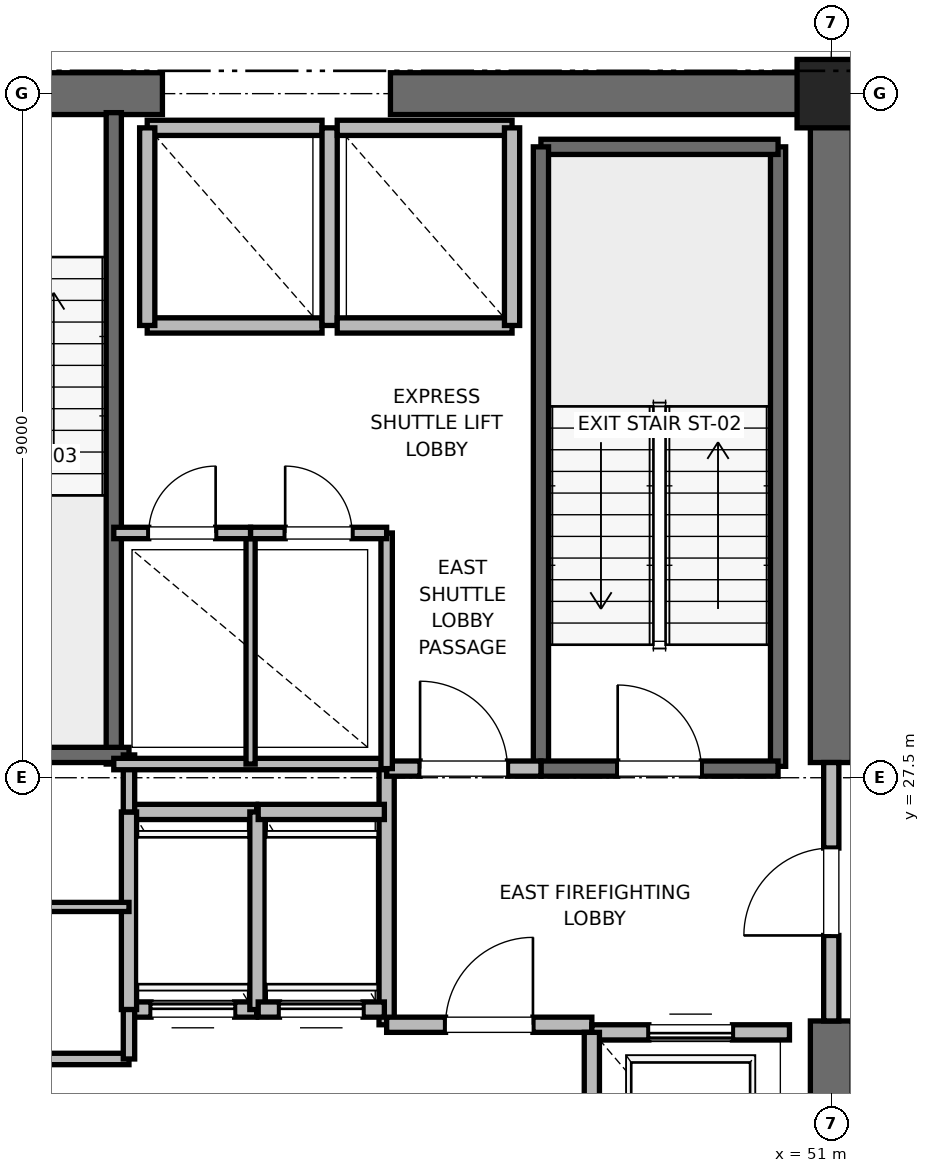
"""IFC4 building model, lengths in metres.
Left out: names, types, materials, properties, quantities, classifications, styles, units other than length and angle.
Written with IfcOpenShell. Run it as: python <this file> out.ifc"""

import sys

from ifc_helpers import new_model, si_unit, direction, frame, frame_2d, origin, origin_2d, place, context, subcontext, project, spatial, rectangle, extrude, element, fill, save


model = new_model("IFC4")
c1 = context("Model", 3, precision=1e-05, world=origin(), true_north=direction((0.0, 1.0)))
c2 = subcontext(c1, "Body", "Model", "MODEL_VIEW")
j1 = project(units=[si_unit("LENGTHUNIT", "METRE"), si_unit("PLANEANGLEUNIT", "RADIAN")], contexts=[c1])
p1 = place(None, origin())
s1 = spatial("IfcSite", under=j1, at=p1, CompositionType="ELEMENT")
p2 = place(p1, origin())
s2 = spatial("IfcBuilding", under=s1, at=p2, CompositionType="ELEMENT")
p3 = place(p2, frame((0.0, 0.0, 205.2)))
s3 = spatial("IfcBuildingStorey", under=s2, at=p3, CompositionType="ELEMENT", Elevation=205.2)
p4 = place(p3, frame((51.0, 36.5, 0.0), z_axis=(0.0, 0.0, 1.0), x_axis=(1.0, 0.0, 0.0)))
e1 = element("IfcColumn", 1, at=p4, inside=s3, PredefinedType="PILASTER", context=c2, shape_type="SweptSolid", body=[
    extrude(rectangle(XDim=0.9, YDim=0.9, at=origin_2d()), origin(), (0.0, 0.0, 1.0), 4.0),
])
p5 = place(p3, frame((37.8, 36.5, 0.0), z_axis=(0.0, 0.0, 1.0), x_axis=(1.0, 0.0, 0.0)))
e2 = element("IfcWall", 2, at=p5, inside=s3, PredefinedType="SHEAR", context=c2, shape_type="SweptSolid", body=[
    extrude(rectangle(XDim=4.4, YDim=0.55, at=frame_2d((2.2, 0.0))), origin(), (0.0, 0.0, 1.0), 3.775),
])
p6 = place(p5, frame((1.65, 0.0, 0.0)))
e3 = element("IfcOpeningElement", 3, at=p6, cuts=e2, PredefinedType="OPENING", context=c2, shape_type="SweptSolid", body=[
    extrude(rectangle(XDim=1.1, YDim=2.15, at=frame_2d((0.55, 1.075))), frame((0.0, 0.275, 0.0), z_axis=(0.0, -1.0, 0.0), x_axis=(1.0, 0.0, 0.0)), (0.0, 0.0, 1.0), 0.55),
])
for number, where, z_axis, x_axis in (
    (4, (45.2, 36.5, 0.0), (0.0, 0.0, 1.0), (1.0, 0.0, 0.0)),
    (5, (51.0, 18.5, 0.0), (0.0, 0.0, 1.0), (0.0, 1.0, 0.0)),
):
    element("IfcWall", number, at=place(p3, frame(where, z_axis=z_axis, x_axis=x_axis)), inside=s3, PredefinedType="SHEAR", context=c2, shape_type="SweptSolid", body=[
        extrude(rectangle(XDim=5.8, YDim=0.55, at=frame_2d((2.9, 0.0))), origin(), (0.0, 0.0, 1.0), 3.775),
    ])
p7 = place(p3, frame((51.0, 27.7, 0.0), z_axis=(0.0, 0.0, 1.0), x_axis=(0.0, 1.0, 0.0)))
e6 = element("IfcWall", 6, at=p7, inside=s3, PredefinedType="SHEAR", context=c2, shape_type="SweptSolid", body=[
    extrude(rectangle(XDim=8.8, YDim=0.55, at=frame_2d((4.4, 0.0))), origin(), (0.0, 0.0, 1.0), 3.775),
])
p8 = place(p3, frame((50.3, 27.65, 0.0), z_axis=(0.0, 0.0, 1.0), x_axis=(0.0, 1.0, 0.0)))
e7 = element("IfcWall", 7, at=p8, inside=s3, PredefinedType="SOLIDWALL", context=c2, shape_type="SweptSolid", body=[
    extrude(rectangle(XDim=8.15, YDim=0.2, at=frame_2d((4.075, 0.0))), origin(), (0.0, 0.0, 1.0), 3.775),
])
p9 = place(p3, frame((47.18, 35.8, 0.0), z_axis=(0.0, 0.0, 1.0), x_axis=(1.0, 0.0, 0.0)))
e8 = element("IfcWall", 8, at=p9, inside=s3, PredefinedType="SOLIDWALL", context=c2, shape_type="SweptSolid", body=[
    extrude(rectangle(XDim=3.12, YDim=0.2, at=frame_2d((1.56, 0.0))), origin(), (0.0, 0.0, 1.0), 3.775),
])
p10 = place(p3, frame((47.18, 27.62, 0.0), z_axis=(0.0, 0.0, 1.0), x_axis=(0.0, 1.0, 0.0)))
e9 = element("IfcWall", 9, at=p10, inside=s3, PredefinedType="SOLIDWALL", context=c2, shape_type="SweptSolid", body=[
    extrude(rectangle(XDim=8.18, YDim=0.2, at=frame_2d((4.09, 0.0))), origin(), (0.0, 0.0, 1.0), 3.775),
])
p11 = place(p3, frame((47.18, 27.62, 0.0), z_axis=(0.0, 0.0, 1.0), x_axis=(1.0, 0.0, 0.0)))
e10 = element("IfcWall", 10, at=p11, inside=s3, PredefinedType="SOLIDWALL", context=c2, shape_type="SweptSolid", body=[
    extrude(rectangle(XDim=3.12, YDim=0.2, at=frame_2d((1.56, 0.0))), origin(), (0.0, 0.0, 1.0), 3.775),
])
p12 = place(p11, frame((1.01, 0.0, 0.0)))
e11 = element("IfcOpeningElement", 11, at=p12, cuts=e10, PredefinedType="OPENING", context=c2, shape_type="SweptSolid", body=[
    extrude(rectangle(XDim=1.1, YDim=2.15, at=frame_2d((0.55, 1.075))), frame((0.0, 0.1, 0.0), z_axis=(0.0, -1.0, 0.0), x_axis=(1.0, 0.0, 0.0)), (0.0, 0.0, 1.0), 0.2),
])
p13 = place(p3, frame((41.56, 27.68, 0.0), z_axis=(0.0, 0.0, 1.0), x_axis=(0.0, 1.0, 0.0)))
e12 = element("IfcWall", 12, at=p13, inside=s3, PredefinedType="SOLIDWALL", context=c2, shape_type="SweptSolid", body=[
    extrude(rectangle(XDim=8.57, YDim=0.2, at=frame_2d((4.285, 0.0))), origin(), (0.0, 0.0, 1.0), 3.775),
])
p14 = place(p3, frame((38.44, 27.8, 0.0), z_axis=(0.0, 0.0, 1.0), x_axis=(1.0, 0.0, 0.0)))
e13 = element("IfcWall", 13, at=p14, inside=s3, PredefinedType="SOLIDWALL", context=c2, shape_type="SweptSolid", body=[
    extrude(rectangle(XDim=3.32, YDim=0.2, at=frame_2d((1.66, 0.0))), origin(), (0.0, 0.0, 1.0), 3.775),
])
p15 = place(p3, frame((45.15, 24.25, 0.0), z_axis=(0.0, 0.0, 1.0), x_axis=(0.0, 1.0, 0.0)))
e14 = element("IfcWall", 14, at=p15, inside=s3, PredefinedType="PARTITIONING", context=c2, shape_type="SweptSolid", body=[
    extrude(rectangle(XDim=3.37, YDim=0.2, at=frame_2d((1.685, 0.0))), origin(), (0.0, 0.0, 1.0), 3.775),
])
p16 = place(p3, frame((45.15, 24.25, 0.0), z_axis=(0.0, 0.0, 1.0), x_axis=(1.0, 0.0, 0.0)))
e15 = element("IfcWall", 15, at=p16, inside=s3, PredefinedType="PARTITIONING", context=c2, shape_type="SweptSolid", body=[
    extrude(rectangle(XDim=2.7, YDim=0.2, at=frame_2d((1.35, 0.0))), origin(), (0.0, 0.0, 1.0), 3.775),
])
p17 = place(p16, frame((0.775, 0.0, 0.0)))
e16 = element("IfcOpeningElement", 16, at=p17, cuts=e15, PredefinedType="OPENING", context=c2, shape_type="SweptSolid", body=[
    extrude(rectangle(XDim=1.15, YDim=2.2, at=frame_2d((0.575, 1.1))), frame((0.0, 0.1, 0.0), z_axis=(0.0, -1.0, 0.0), x_axis=(1.0, 0.0, 0.0)), (0.0, 0.0, 1.0), 0.2),
])
p18 = place(p3, frame((45.15, 27.62, 0.0), z_axis=(0.0, 0.0, 1.0), x_axis=(1.0, 0.0, 0.0)))
e17 = element("IfcWall", 17, at=p18, inside=s3, PredefinedType="PARTITIONING", context=c2, shape_type="SweptSolid", body=[
    extrude(rectangle(XDim=2.03, YDim=0.2, at=frame_2d((1.015, 0.0))), origin(), (0.0, 0.0, 1.0), 3.775),
])
p19 = place(p18, frame((0.44, 0.0, 0.0)))
e18 = element("IfcOpeningElement", 18, at=p19, cuts=e17, PredefinedType="OPENING", context=c2, shape_type="SweptSolid", body=[
    extrude(rectangle(XDim=1.15, YDim=2.2, at=frame_2d((0.575, 1.1))), frame((0.0, 0.1, 0.0), z_axis=(0.0, -1.0, 0.0), x_axis=(1.0, 0.0, 0.0)), (0.0, 0.0, 1.0), 0.2),
])
p20 = place(p3, frame((51.0, 24.3, 0.0), z_axis=(0.0, 0.0, 1.0), x_axis=(0.0, 1.0, 0.0)))
e19 = element("IfcWall", 19, at=p20, inside=s3, PredefinedType="PARTITIONING", context=c2, shape_type="SweptSolid", body=[
    extrude(rectangle(XDim=3.4, YDim=0.2, at=frame_2d((1.7, 0.0))), origin(), (0.0, 0.0, 1.0), 2.755),
])
p21 = place(p20, frame((1.125, 0.0, 0.0)))
e20 = element("IfcOpeningElement", 20, at=p21, cuts=e19, PredefinedType="OPENING", context=c2, shape_type="SweptSolid", body=[
    extrude(rectangle(XDim=1.15, YDim=2.2, at=frame_2d((0.575, 1.1))), frame((0.0, 0.1, 0.0), z_axis=(0.0, -1.0, 0.0), x_axis=(1.0, 0.0, 0.0)), (0.0, 0.0, 1.0), 0.2),
])
p22 = place(p3, frame((50.45, 24.15, 0.0), z_axis=(0.0, 0.0, 1.0), x_axis=(-1.0, 0.0, 0.0)))
e21 = element("IfcWall", 21, at=p22, inside=s3, PredefinedType="SOLIDWALL", context=c2, shape_type="SweptSolid", body=[
    extrude(rectangle(XDim=2.6, YDim=0.2, at=frame_2d((1.3, 0.0))), origin(), (0.0, 0.0, 1.0), 2.755),
])
p23 = place(p22, frame((0.75, 0.0, 0.0)))
e22 = element("IfcOpeningElement", 22, at=p23, cuts=e21, PredefinedType="OPENING", context=c2, shape_type="SweptSolid", body=[
    extrude(rectangle(XDim=1.1, YDim=2.2, at=frame_2d((0.55, 1.1))), frame((0.0, 0.1, 0.0), z_axis=(0.0, -1.0, 0.0), x_axis=(1.0, 0.0, 0.0)), (0.0, 0.0, 1.0), 0.2),
])
p24 = place(p3, frame((47.85, 24.15, 0.0), z_axis=(0.0, 0.0, 1.0), x_axis=(0.0, -1.0, 0.0)))
e23 = element("IfcWall", 23, at=p24, inside=s3, PredefinedType="SOLIDWALL", context=c2, shape_type="SweptSolid", body=[
    extrude(rectangle(XDim=3.0, YDim=0.2, at=frame_2d((1.5, 0.0))), origin(), (0.0, 0.0, 1.0), 3.775),
])
p25 = place(p3, frame((41.76, 24.45, 0.0), z_axis=(0.0, 0.0, 1.0), x_axis=(1.0, 0.0, 0.0)))
e24 = element("IfcWall", 24, at=p25, inside=s3, PredefinedType="SOLIDWALL", context=c2, shape_type="SweptSolid", body=[
    extrude(rectangle(XDim=1.68, YDim=0.2, at=frame_2d((0.84, 0.0))), origin(), (0.0, 0.0, 1.0), 3.775),
])
p26 = place(p25, frame((0.29, 0.0, 0.0)))
e25 = element("IfcOpeningElement", 25, at=p26, cuts=e24, PredefinedType="OPENING", context=c2, shape_type="SweptSolid", body=[
    extrude(rectangle(XDim=1.1, YDim=2.2, at=frame_2d((0.55, 1.1))), frame((0.0, 0.1, 0.0), z_axis=(0.0, -1.0, 0.0), x_axis=(1.0, 0.0, 0.0)), (0.0, 0.0, 1.0), 0.2),
])
p27 = place(p3, frame((43.44, 27.05, 0.0), z_axis=(0.0, 0.0, 1.0), x_axis=(-1.0, 0.0, 0.0)))
e26 = element("IfcWall", 26, at=p27, inside=s3, PredefinedType="SOLIDWALL", context=c2, shape_type="SweptSolid", body=[
    extrude(rectangle(XDim=1.68, YDim=0.2, at=frame_2d((0.84, 0.0))), origin(), (0.0, 0.0, 1.0), 3.775),
])
for number, where, z_axis, x_axis in (
    (27, (41.76, 27.05, 0.0), (0.0, 0.0, 1.0), (0.0, -1.0, 0.0)),
    (28, (43.45, 24.45, 0.0), (0.0, 0.0, 1.0), (0.0, 1.0, 0.0)),
):
    element("IfcWall", number, at=place(p3, frame(where, z_axis=z_axis, x_axis=x_axis)), inside=s3, PredefinedType="SOLIDWALL", context=c2, shape_type="SweptSolid", body=[
        extrude(rectangle(XDim=2.6, YDim=0.2, at=frame_2d((1.3, 0.0))), origin(), (0.0, 0.0, 1.0), 3.775),
    ])
p28 = place(p3, frame((43.46, 24.45, 0.0), z_axis=(0.0, 0.0, 1.0), x_axis=(1.0, 0.0, 0.0)))
e29 = element("IfcWall", 29, at=p28, inside=s3, PredefinedType="SOLIDWALL", context=c2, shape_type="SweptSolid", body=[
    extrude(rectangle(XDim=1.66, YDim=0.2, at=frame_2d((0.83, 0.0))), origin(), (0.0, 0.0, 1.0), 3.775),
])
p29 = place(p28, frame((0.28, 0.0, 0.0)))
e30 = element("IfcOpeningElement", 30, at=p29, cuts=e29, PredefinedType="OPENING", context=c2, shape_type="SweptSolid", body=[
    extrude(rectangle(XDim=1.1, YDim=2.2, at=frame_2d((0.55, 1.1))), frame((0.0, 0.1, 0.0), z_axis=(0.0, -1.0, 0.0), x_axis=(1.0, 0.0, 0.0)), (0.0, 0.0, 1.0), 0.2),
])
p30 = place(p3, frame((45.12, 27.05, 0.0), z_axis=(0.0, 0.0, 1.0), x_axis=(-1.0, 0.0, 0.0)))
e31 = element("IfcWall", 31, at=p30, inside=s3, PredefinedType="SOLIDWALL", context=c2, shape_type="SweptSolid", body=[
    extrude(rectangle(XDim=1.66, YDim=0.2, at=frame_2d((0.83, 0.0))), origin(), (0.0, 0.0, 1.0), 3.775),
])
p31 = place(p3, frame((42.0, 33.45, 0.0), z_axis=(0.0, 0.0, 1.0), x_axis=(1.0, 0.0, 0.0)))
e32 = element("IfcWall", 32, at=p31, inside=s3, PredefinedType="SOLIDWALL", context=c2, shape_type="SweptSolid", body=[
    extrude(rectangle(XDim=2.3, YDim=0.2, at=frame_2d((1.15, 0.0))), origin(), (0.0, 0.0, 1.0), 3.775),
])
p32 = place(p3, frame((44.3, 36.05, 0.0), z_axis=(0.0, 0.0, 1.0), x_axis=(-1.0, 0.0, 0.0)))
e33 = element("IfcWall", 33, at=p32, inside=s3, PredefinedType="SOLIDWALL", context=c2, shape_type="SweptSolid", body=[
    extrude(rectangle(XDim=2.3, YDim=0.2, at=frame_2d((1.15, 0.0))), origin(), (0.0, 0.0, 1.0), 2.755),
])
for number, where, z_axis, x_axis in (
    (34, (42.0, 36.05, 0.0), (0.0, 0.0, 1.0), (0.0, -1.0, 0.0)),
    (35, (44.4, 33.45, 0.0), (0.0, 0.0, 1.0), (0.0, 1.0, 0.0)),
):
    element("IfcWall", number, at=place(p3, frame(where, z_axis=z_axis, x_axis=x_axis)), inside=s3, PredefinedType="SOLIDWALL", context=c2, shape_type="SweptSolid", body=[
        extrude(rectangle(XDim=2.6, YDim=0.2, at=frame_2d((1.3, 0.0))), origin(), (0.0, 0.0, 1.0), 2.755),
    ])
p33 = place(p3, frame((44.5, 33.45, 0.0), z_axis=(0.0, 0.0, 1.0), x_axis=(1.0, 0.0, 0.0)))
e36 = element("IfcWall", 36, at=p33, inside=s3, PredefinedType="SOLIDWALL", context=c2, shape_type="SweptSolid", body=[
    extrude(rectangle(XDim=2.3, YDim=0.2, at=frame_2d((1.15, 0.0))), origin(), (0.0, 0.0, 1.0), 3.775),
])
p34 = place(p3, frame((46.8, 36.05, 0.0), z_axis=(0.0, 0.0, 1.0), x_axis=(-1.0, 0.0, 0.0)))
e37 = element("IfcWall", 37, at=p34, inside=s3, PredefinedType="SOLIDWALL", context=c2, shape_type="SweptSolid", body=[
    extrude(rectangle(XDim=2.3, YDim=0.2, at=frame_2d((1.15, 0.0))), origin(), (0.0, 0.0, 1.0), 2.755),
])
p35 = place(p3, frame((46.8, 33.45, 0.0), z_axis=(0.0, 0.0, 1.0), x_axis=(0.0, 1.0, 0.0)))
e38 = element("IfcWall", 38, at=p35, inside=s3, PredefinedType="SOLIDWALL", context=c2, shape_type="SweptSolid", body=[
    extrude(rectangle(XDim=2.6, YDim=0.2, at=frame_2d((1.3, 0.0))), origin(), (0.0, 0.0, 1.0), 3.775),
])
p36 = place(p3, frame((39.95, 23.8, 0.0), z_axis=(0.0, 0.0, 1.0), x_axis=(1.0, 0.0, 0.0)))
e39 = element("IfcWall", 39, at=p36, inside=s3, PredefinedType="PARTITIONING", context=c2, shape_type="SweptSolid", body=[
    extrude(rectangle(XDim=1.81, YDim=0.15, at=frame_2d((0.905, 0.0))), origin(), (0.0, 0.0, 1.0), 2.85),
])
p37 = place(p3, frame((39.95, 25.8, 0.0), z_axis=(0.0, 0.0, 1.0), x_axis=(1.0, 0.0, 0.0)))
e40 = element("IfcWall", 40, at=p37, inside=s3, PredefinedType="PARTITIONING", context=c2, shape_type="SweptSolid", body=[
    extrude(rectangle(XDim=1.81, YDim=0.12, at=frame_2d((0.905, 0.0))), origin(), (0.0, 0.0, 1.0), 2.85),
])
p38 = place(p3, frame((41.76, 23.8, 0.0), z_axis=(0.0, 0.0, 1.0), x_axis=(0.0, 1.0, 0.0)))
e41 = element("IfcWall", 41, at=p38, inside=s3, PredefinedType="PARTITIONING", context=c2, shape_type="SweptSolid", body=[
    extrude(rectangle(XDim=0.65, YDim=0.15, at=frame_2d((0.325, 0.0))), origin(), (0.0, 0.0, 1.0), 2.85),
])
p39 = place(p3, frame((41.76, 27.05, 0.0), z_axis=(0.0, 0.0, 1.0), x_axis=(0.0, 1.0, 0.0)))
e42 = element("IfcWall", 42, at=p39, inside=s3, PredefinedType="PARTITIONING", context=c2, shape_type="SweptSolid", body=[
    extrude(rectangle(XDim=0.75, YDim=0.15, at=frame_2d((0.375, 0.0))), origin(), (0.0, 0.0, 1.0), 2.85),
])
p40 = place(p3, frame((41.56, 27.68, 0.0), z_axis=(0.0, 0.0, 1.0), x_axis=(1.0, 0.0, 0.0)))
e43 = element("IfcWall", 43, at=p40, inside=s3, PredefinedType="PARTITIONING", context=c2, shape_type="SweptSolid", body=[
    extrude(rectangle(XDim=3.59, YDim=0.15, at=frame_2d((1.795, 0.0))), origin(), (0.0, 0.0, 1.0), 2.85),
])
p41 = place(p3, frame((45.15, 27.62, 0.0), z_axis=(0.0, 0.0, 1.0), x_axis=(0.0, 1.0, 0.0)))
e44 = element("IfcWall", 44, at=p41, inside=s3, PredefinedType="PARTITIONING", context=c2, shape_type="SweptSolid", body=[
    extrude(rectangle(XDim=3.1, YDim=0.15, at=frame_2d((1.55, 0.0))), origin(), (0.0, 0.0, 1.0), 2.85),
])
p42 = place(p3, frame((43.36, 27.68, 0.0), z_axis=(0.0, 0.0, 1.0), x_axis=(0.0, 1.0, 0.0)))
e45 = element("IfcWall", 45, at=p42, inside=s3, PredefinedType="PARTITIONING", context=c2, shape_type="SweptSolid", body=[
    extrude(rectangle(XDim=3.04, YDim=0.12, at=frame_2d((1.52, 0.0))), origin(), (0.0, 0.0, 1.0), 2.85),
])
p43 = place(p3, frame((41.56, 30.72, 0.0), z_axis=(0.0, 0.0, 1.0), x_axis=(1.0, 0.0, 0.0)))
e46 = element("IfcWall", 46, at=p43, inside=s3, PredefinedType="PARTITIONING", context=c2, shape_type="SweptSolid", body=[
    extrude(rectangle(XDim=1.8, YDim=0.15, at=frame_2d((0.9, 0.0))), origin(), (0.0, 0.0, 1.0), 2.85),
])
p44 = place(p43, frame((0.46, 0.0, 0.0)))
e47 = element("IfcOpeningElement", 47, at=p44, cuts=e46, PredefinedType="OPENING", context=c2, shape_type="SweptSolid", body=[
    extrude(rectangle(XDim=0.88, YDim=2.1, at=frame_2d((0.44, 1.05))), frame((0.0, 0.075, 0.0), z_axis=(0.0, -1.0, 0.0), x_axis=(1.0, 0.0, 0.0)), (0.0, 0.0, 1.0), 0.15),
])
p45 = place(p3, frame((43.36, 30.72, 0.0), z_axis=(0.0, 0.0, 1.0), x_axis=(1.0, 0.0, 0.0)))
e48 = element("IfcWall", 48, at=p45, inside=s3, PredefinedType="PARTITIONING", context=c2, shape_type="SweptSolid", body=[
    extrude(rectangle(XDim=1.79, YDim=0.15, at=frame_2d((0.895, 0.0))), origin(), (0.0, 0.0, 1.0), 2.85),
])
p46 = place(p45, frame((0.455, 0.0, 0.0)))
e49 = element("IfcOpeningElement", 49, at=p46, cuts=e48, PredefinedType="OPENING", context=c2, shape_type="SweptSolid", body=[
    extrude(rectangle(XDim=0.88, YDim=2.1, at=frame_2d((0.44, 1.05))), frame((0.0, 0.075, 0.0), z_axis=(0.0, -1.0, 0.0), x_axis=(1.0, 0.0, 0.0)), (0.0, 0.0, 1.0), 0.15),
])
p47 = place(p12, origin())
e50 = element("IfcDoor", 50, at=p47, inside=s3, OperationType="SINGLE_SWING_LEFT", PredefinedType="DOOR", context=c2, shape_type="SweptSolid", body=[
    extrude(rectangle(XDim=1.1, YDim=2.15, at=frame_2d((0.55, 1.075))), frame((0.0, 0.025, 0.0), z_axis=(0.0, -1.0, 0.0), x_axis=(1.0, 0.0, 0.0)), (0.0, 0.0, 1.0), 0.05),
])
fill(e11, e50)
p48 = place(p17, origin())
e51 = element("IfcDoor", 51, at=p48, inside=s3, OperationType="SINGLE_SWING_RIGHT", PredefinedType="DOOR", context=c2, shape_type="SweptSolid", body=[
    extrude(rectangle(XDim=1.15, YDim=2.2, at=frame_2d((0.575, 1.1))), frame((0.0, 0.025, 0.0), z_axis=(0.0, -1.0, 0.0), x_axis=(1.0, 0.0, 0.0)), (0.0, 0.0, 1.0), 0.05),
])
fill(e16, e51)
p49 = place(p19, origin())
e52 = element("IfcDoor", 52, at=p49, inside=s3, OperationType="SINGLE_SWING_LEFT", PredefinedType="DOOR", context=c2, shape_type="SweptSolid", body=[
    extrude(rectangle(XDim=1.15, YDim=2.2, at=frame_2d((0.575, 1.1))), frame((0.0, 0.025, 0.0), z_axis=(0.0, -1.0, 0.0), x_axis=(1.0, 0.0, 0.0)), (0.0, 0.0, 1.0), 0.05),
])
fill(e18, e52)
p50 = place(p21, origin())
e53 = element("IfcDoor", 53, at=p50, inside=s3, OperationType="SINGLE_SWING_LEFT", PredefinedType="DOOR", context=c2, shape_type="SweptSolid", body=[
    extrude(rectangle(XDim=1.15, YDim=2.2, at=frame_2d((0.575, 1.1))), frame((0.0, 0.025, 0.0), z_axis=(0.0, -1.0, 0.0), x_axis=(1.0, 0.0, 0.0)), (0.0, 0.0, 1.0), 0.05),
])
fill(e20, e53)
p51 = place(p23, origin())
e54 = element("IfcDoor", 54, at=p51, inside=s3, OperationType="SLIDING_TO_RIGHT", PredefinedType="DOOR", context=c2, shape_type="SweptSolid", body=[
    extrude(rectangle(XDim=1.1, YDim=2.2, at=frame_2d((0.55, 1.1))), frame((0.0, 0.025, 0.0), z_axis=(0.0, -1.0, 0.0), x_axis=(1.0, 0.0, 0.0)), (0.0, 0.0, 1.0), 0.05),
])
fill(e22, e54)
p52 = place(p26, origin())
e55 = element("IfcDoor", 55, at=p52, inside=s3, OperationType="SLIDING_TO_RIGHT", PredefinedType="DOOR", context=c2, shape_type="SweptSolid", body=[
    extrude(rectangle(XDim=1.1, YDim=2.2, at=frame_2d((0.55, 1.1))), frame((0.0, 0.025, 0.0), z_axis=(0.0, -1.0, 0.0), x_axis=(1.0, 0.0, 0.0)), (0.0, 0.0, 1.0), 0.05),
])
fill(e25, e55)
p53 = place(p29, origin())
e56 = element("IfcDoor", 56, at=p53, inside=s3, OperationType="SLIDING_TO_RIGHT", PredefinedType="DOOR", context=c2, shape_type="SweptSolid", body=[
    extrude(rectangle(XDim=1.1, YDim=2.2, at=frame_2d((0.55, 1.1))), frame((0.0, 0.025, 0.0), z_axis=(0.0, -1.0, 0.0), x_axis=(1.0, 0.0, 0.0)), (0.0, 0.0, 1.0), 0.05),
])
fill(e30, e56)
p54 = place(p44, origin())
e57 = element("IfcDoor", 57, at=p54, inside=s3, OperationType="SINGLE_SWING_RIGHT", PredefinedType="DOOR", context=c2, shape_type="SweptSolid", body=[
    extrude(rectangle(XDim=0.88, YDim=2.1, at=frame_2d((0.44, 1.05))), frame((0.0, 0.025, 0.0), z_axis=(0.0, -1.0, 0.0), x_axis=(1.0, 0.0, 0.0)), (0.0, 0.0, 1.0), 0.05),
])
fill(e47, e57)
p55 = place(p46, origin())
e58 = element("IfcDoor", 58, at=p55, inside=s3, OperationType="SINGLE_SWING_LEFT", PredefinedType="DOOR", context=c2, shape_type="SweptSolid", body=[
    extrude(rectangle(XDim=0.88, YDim=2.1, at=frame_2d((0.44, 1.05))), frame((0.0, 0.025, 0.0), z_axis=(0.0, -1.0, 0.0), x_axis=(1.0, 0.0, 0.0)), (0.0, 0.0, 1.0), 0.05),
])
fill(e49, e58)
save(model, sys.argv[1])
